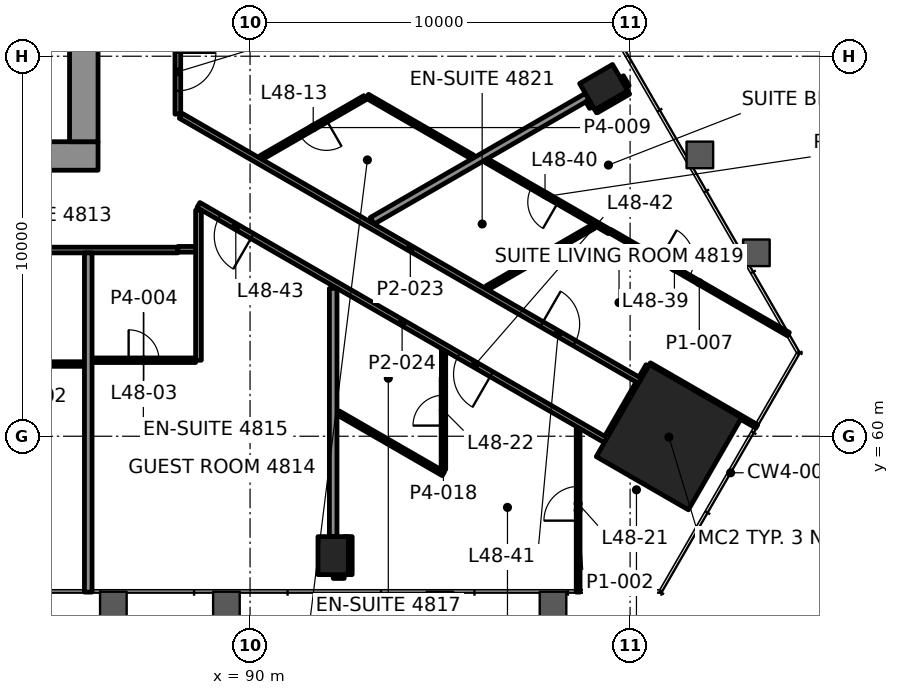
"""IFC4 building model, lengths in metres.
Left out: names, types, materials, properties, quantities, classifications, styles, units other than length and angle.
Written with IfcOpenShell. Run it as: python <this file> out.ifc"""

import sys

from ifc_helpers import new_model, si_unit, direction, frame, frame_2d, origin, origin_2d, place, context, subcontext, project, spatial, rectangle, hollow_rectangle, extrude, element, fill, save


model = new_model("IFC4")
c1 = context("Model", 3, precision=1e-05, world=origin(), true_north=direction((0.0, 1.0)))
c2 = subcontext(c1, "Body", "Model", "MODEL_VIEW")
j1 = project(units=[si_unit("LENGTHUNIT", "METRE"), si_unit("PLANEANGLEUNIT", "RADIAN")], contexts=[c1])
p1 = place(None, origin())
s1 = spatial("IfcSite", under=j1, at=p1, CompositionType="ELEMENT")
p2 = place(p1, origin())
s2 = spatial("IfcBuilding", under=s1, at=p2, CompositionType="ELEMENT")
p3 = place(p2, frame((0.0, 0.0, 206.5)))
s3 = spatial("IfcBuildingStorey", under=s2, at=p3, CompositionType="ELEMENT", Elevation=206.5)
p4 = place(p3, frame((101.022, 59.976, 0.0), z_axis=(0.0, 0.0, 1.0), x_axis=(0.5, 0.866025403784, 0.0)))
e1 = element("IfcColumn", 1, at=p4, inside=s3, PredefinedType="COLUMN", context=c2, shape_type="SweptSolid", body=[
    extrude(rectangle(XDim=2.8, YDim=2.8, at=origin_2d()), origin(), (0.0, 0.0, 1.0), 3.9),
])
for number, where, z_axis, x_axis in (
    (2, (92.188, 56.858, -0.0), (0.0, 0.0, 1.0), (1.0, 0.0, 0.0)),
    (3, (99.305, 69.186, -0.0), (0.0, 0.0, 1.0), (-0.5, 0.866, 0.0)),
):
    element("IfcColumn", number, at=place(p3, frame(where, z_axis=z_axis, x_axis=x_axis)), inside=s3, PredefinedType="COLUMN", context=c2, shape_type="SweptSolid", body=[
        extrude(hollow_rectangle(XDim=0.8, YDim=1.0, WallThickness=0.05, at=origin_2d()), origin(), (0.0, 0.0, 1.0), 3.9),
    ])
p5 = place(p3, frame((64.0, 67.375, 0.0), z_axis=(0.0, 0.0, 1.0), x_axis=(1.0, 0.0, 0.0)))
e4 = element("IfcWall", 4, at=p5, inside=s3, PredefinedType="SHEAR", context=c2, shape_type="SweptSolid", body=[
    extrude(rectangle(XDim=22.0, YDim=0.75, at=frame_2d((11.0, 0.0))), origin(), (0.0, 0.0, 1.0), 3.7),
])
p6 = place(p5, frame((1.575, 0.0, 0.0)))
e5 = element("IfcOpeningElement", 5, at=p6, cuts=e4, PredefinedType="OPENING", context=c2, shape_type="SweptSolid", body=[
    extrude(rectangle(XDim=0.9, YDim=2.1, at=frame_2d((0.45, 1.05))), frame((0.0, 0.385, 0.0), z_axis=(0.0, -1.0, 0.0), x_axis=(1.0, 0.0, 0.0)), (0.0, 0.0, 1.0), 0.77),
])
p7 = place(p5, frame((4.425, 0.0, 0.0)))
e6 = element("IfcOpeningElement", 6, at=p7, cuts=e4, PredefinedType="OPENING", context=c2, shape_type="SweptSolid", body=[
    extrude(rectangle(XDim=0.9, YDim=2.1, at=frame_2d((0.45, 1.05))), frame((0.0, 0.385, 0.0), z_axis=(0.0, -1.0, 0.0), x_axis=(1.0, 0.0, 0.0)), (0.0, 0.0, 1.0), 0.77),
])
p8 = place(p3, frame((85.625, 67.75, 0.0), z_axis=(0.0, 0.0, 1.0), x_axis=(0.0, 1.0, 0.0)))
e7 = element("IfcWall", 7, at=p8, inside=s3, PredefinedType="SHEAR", context=c2, shape_type="SweptSolid", body=[
    extrude(rectangle(XDim=14.5, YDim=0.75, at=frame_2d((7.25, 0.0))), origin(), (0.0, 0.0, 1.0), 3.7),
])
p9 = place(p8, frame((4.65, 0.0, 0.0)))
e8 = element("IfcOpeningElement", 8, at=p9, cuts=e7, PredefinedType="OPENING", context=c2, shape_type="SweptSolid", body=[
    extrude(rectangle(XDim=1.8, YDim=2.1, at=frame_2d((0.9, 1.05))), frame((0.0, 0.385, 0.0), z_axis=(0.0, -1.0, 0.0), x_axis=(1.0, 0.0, 0.0)), (0.0, 0.0, 1.0), 0.77),
])
p10 = place(p8, frame((11.8, 0.0, 0.0)))
e9 = element("IfcOpeningElement", 9, at=p10, cuts=e7, PredefinedType="OPENING", context=c2, shape_type="SweptSolid", body=[
    extrude(rectangle(XDim=0.9, YDim=2.1, at=frame_2d((0.45, 1.05))), frame((0.0, 0.385, 0.0), z_axis=(0.0, -1.0, 0.0), x_axis=(1.0, 0.0, 0.0)), (0.0, 0.0, 1.0), 0.77),
])
p11 = place(p3, frame((92.188, 56.358, 0.0), z_axis=(0.0, 0.0, 1.0), x_axis=(1.0, 0.0, 0.0)))
e10 = element("IfcWall", 10, at=p11, inside=s3, PredefinedType="PARTITIONING", context=c2, shape_type="SweptSolid", body=[
    extrude(rectangle(XDim=0.29, YDim=0.2, at=frame_2d((0.145, 0.0))), origin(), (0.0, 0.0, 1.0), 3.1),
])
p12 = place(p3, frame((82.365, 61.9, 0.0), z_axis=(0.0, 0.0, 1.0), x_axis=(1.0, 0.0, 0.0)))
e11 = element("IfcWall", 11, at=p12, inside=s3, PredefinedType="PARTITIONING", context=c2, shape_type="SweptSolid", body=[
    extrude(rectangle(XDim=3.267, YDim=0.12, at=frame_2d((1.634, 0.0))), origin(), (0.0, 0.0, 1.0), 3.1),
])
p13 = place(p12, frame((1.533, 0.0, 0.0)))
e12 = element("IfcOpeningElement", 12, at=p13, cuts=e11, PredefinedType="OPENING", context=c2, shape_type="SweptSolid", body=[
    extrude(rectangle(XDim=0.8, YDim=2.1, at=frame_2d((0.4, 1.05))), frame((0.0, 0.07, 0.0), z_axis=(0.0, -1.0, 0.0), x_axis=(1.0, 0.0, 0.0)), (0.0, 0.0, 1.0), 0.14),
])
p14 = place(p3, frame((85.842, 62.0, 0.0), z_axis=(0.0, 0.0, 1.0), x_axis=(1.0, 0.0, 0.0)))
e13 = element("IfcWall", 13, at=p14, inside=s3, PredefinedType="PARTITIONING", context=c2, shape_type="SweptSolid", body=[
    extrude(rectangle(XDim=2.725, YDim=0.12, at=frame_2d((1.363, 0.0))), origin(), (0.0, 0.0, 1.0), 3.1),
])
p15 = place(p14, frame((0.963, 0.0, 0.0)))
e14 = element("IfcOpeningElement", 14, at=p15, cuts=e13, PredefinedType="OPENING", context=c2, shape_type="SweptSolid", body=[
    extrude(rectangle(XDim=0.8, YDim=2.1, at=frame_2d((0.4, 1.05))), frame((0.0, 0.07, 0.0), z_axis=(0.0, -1.0, 0.0), x_axis=(1.0, 0.0, 0.0)), (0.0, 0.0, 1.0), 0.14),
])
p16 = place(p3, frame((88.1, 64.9, 0.0), z_axis=(0.0, 0.0, 1.0), x_axis=(-1.0, 0.0, 0.0)))
e15 = element("IfcWall", 15, at=p16, inside=s3, PredefinedType="PARTITIONING", context=c2, shape_type="SweptSolid", body=[
    extrude(rectangle(XDim=26.2, YDim=0.15, at=frame_2d((13.1, 0.0))), origin(), (0.0, 0.0, 1.0), 3.1),
])
p17 = place(p16, frame((7.443, 0.0, 0.0)))
e16 = element("IfcOpeningElement", 16, at=p17, cuts=e15, PredefinedType="OPENING", context=c2, shape_type="SweptSolid", body=[
    extrude(rectangle(XDim=1.0, YDim=2.1, at=frame_2d((0.5, 1.05))), frame((0.0, 0.085, 0.0), z_axis=(0.0, -1.0, 0.0), x_axis=(1.0, 0.0, 0.0)), (0.0, 0.0, 1.0), 0.17),
])
p18 = place(p16, frame((16.037, 0.0, 0.0)))
e17 = element("IfcOpeningElement", 17, at=p18, cuts=e15, PredefinedType="OPENING", context=c2, shape_type="SweptSolid", body=[
    extrude(rectangle(XDim=1.0, YDim=2.1, at=frame_2d((0.5, 1.05))), frame((0.0, 0.085, 0.0), z_axis=(0.0, -1.0, 0.0), x_axis=(1.0, 0.0, 0.0)), (0.0, 0.0, 1.0), 0.17),
])
p19 = place(p16, frame((19.747, 0.0, 0.0)))
e18 = element("IfcOpeningElement", 18, at=p19, cuts=e15, PredefinedType="OPENING", context=c2, shape_type="SweptSolid", body=[
    extrude(rectangle(XDim=1.0, YDim=2.1, at=frame_2d((0.5, 1.05))), frame((0.0, 0.085, 0.0), z_axis=(0.0, -1.0, 0.0), x_axis=(1.0, 0.0, 0.0)), (0.0, 0.0, 1.0), 0.17),
])
p20 = place(p16, frame((24.013, 0.0, 0.0)))
e19 = element("IfcOpeningElement", 19, at=p20, cuts=e15, PredefinedType="OPENING", context=c2, shape_type="SweptSolid", body=[
    extrude(rectangle(XDim=1.0, YDim=2.1, at=frame_2d((0.5, 1.05))), frame((0.0, 0.085, 0.0), z_axis=(0.0, -1.0, 0.0), x_axis=(1.0, 0.0, 0.0)), (0.0, 0.0, 1.0), 0.17),
])
p21 = place(p3, frame((88.1, 64.919, 0.0), z_axis=(0.0, 0.0, 1.0), x_axis=(1.0, 0.0, 0.0)))
e20 = element("IfcWall", 20, at=p21, inside=s3, PredefinedType="PARTITIONING", context=c2, shape_type="SweptSolid", body=[
    extrude(rectangle(XDim=0.468, YDim=0.15, at=frame_2d((0.234, 0.0))), origin(), (0.0, 0.0, 1.0), 3.1),
])
p22 = place(p3, frame((96.237, 63.904, 0.0), z_axis=(0.0, 0.0, 1.0), x_axis=(0.86605210011, 0.499953757757, 0.0)))
e21 = element("IfcWall", 21, at=p22, inside=s3, PredefinedType="PARTITIONING", context=c2, shape_type="SweptSolid", body=[
    extrude(rectangle(XDim=3.228, YDim=0.12, at=frame_2d((1.614, 0.0))), origin(), (0.0, 0.0, 1.0), 3.1),
])
p23 = place(p3, frame((99.073, 68.59, 0.0), z_axis=(0.0, 0.0, 1.0), x_axis=(0.866039090965, 0.499976292358, 0.0)))
e22 = element("IfcWall", 22, at=p23, inside=s3, PredefinedType="PARTITIONING", context=c2, shape_type="SweptSolid", body=[
    extrude(rectangle(XDim=0.999, YDim=0.2, at=frame_2d((0.5, 0.0))), origin(), (0.0, 0.0, 1.0), 3.1),
])
p24 = place(p3, frame((93.215, 65.669, 0.0), z_axis=(0.0, 0.0, 1.0), x_axis=(0.866021893259, 0.50000608036, 0.0)))
e23 = element("IfcWall", 23, at=p24, inside=s3, PredefinedType="PARTITIONING", context=c2, shape_type="SweptSolid", body=[
    extrude(rectangle(XDim=6.532, YDim=0.2, at=frame_2d((3.266, 0.0))), origin(), (0.0, 0.0, 1.0), 3.1),
])
p25 = place(p3, frame((93.027, 68.911, 0.0), z_axis=(0.0, 0.0, 1.0), x_axis=(-0.866028267601, -0.499995039691, 0.0)))
e24 = element("IfcWall", 24, at=p25, inside=s3, PredefinedType="PARTITIONING", context=c2, shape_type="SweptSolid", body=[
    extrude(rectangle(XDim=3.153, YDim=0.12, at=frame_2d((1.576, 0.0))), origin(), (0.0, 0.0, 1.0), 3.1),
])
p26 = place(p25, frame((1.176, 0.0, 0.0)))
e25 = element("IfcOpeningElement", 25, at=p26, cuts=e24, PredefinedType="OPENING", context=c2, shape_type="SweptSolid", body=[
    extrude(rectangle(XDim=0.8, YDim=2.1, at=frame_2d((0.4, 1.05))), frame((0.0, 0.07, 0.0), z_axis=(0.0, -1.0, 0.0), x_axis=(1.0, 0.0, 0.0)), (0.0, 0.0, 1.0), 0.14),
])
p27 = place(p3, frame((99.398, 59.962, 0.0), z_axis=(0.0, 0.0, 1.0), x_axis=(0.499927431592, 0.866067297121, 0.0)))
e26 = element("IfcWall", 26, at=p27, inside=s3, PredefinedType="PARTITIONING", context=c2, shape_type="SweptSolid", body=[
    extrude(rectangle(XDim=1.65, YDim=0.15, at=frame_2d((0.825, 0.0))), origin(), (0.0, 0.0, 1.0), 2.947),
])
p28 = place(p3, frame((98.633, 55.898, 0.0), z_axis=(0.0, 0.0, 1.0), x_axis=(0.0, 1.0, 0.0)))
e27 = element("IfcWall", 27, at=p28, inside=s3, PredefinedType="PARTITIONING", context=c2, shape_type="SweptSolid", body=[
    extrude(rectangle(XDim=4.302, YDim=0.1, at=frame_2d((2.151, 0.0))), origin(), (0.0, 0.0, 1.0), 3.1),
])
p29 = place(p28, frame((1.881, 0.0, 0.0)))
e28 = element("IfcOpeningElement", 28, at=p29, cuts=e27, PredefinedType="OPENING", context=c2, shape_type="SweptSolid", body=[
    extrude(rectangle(XDim=0.9, YDim=2.1, at=frame_2d((0.45, 1.05))), frame((0.0, 0.06, 0.0), z_axis=(0.0, -1.0, 0.0), x_axis=(1.0, 0.0, 0.0)), (0.0, 0.0, 1.0), 0.12),
])
p30 = place(p3, frame((95.088, 59.124, 0.0), z_axis=(0.0, 0.0, 1.0), x_axis=(0.0, 1.0, 0.0)))
e29 = element("IfcWall", 29, at=p30, inside=s3, PredefinedType="PARTITIONING", context=c2, shape_type="SweptSolid", body=[
    extrude(rectangle(XDim=3.113, YDim=0.12, at=frame_2d((1.556, 0.0))), origin(), (0.0, 0.0, 1.0), 3.1),
])
p31 = place(p30, frame((1.156, 0.0, 0.0)))
e30 = element("IfcOpeningElement", 30, at=p31, cuts=e29, PredefinedType="OPENING", context=c2, shape_type="SweptSolid", body=[
    extrude(rectangle(XDim=0.8, YDim=2.1, at=frame_2d((0.4, 1.05))), frame((0.0, 0.07, 0.0), z_axis=(0.0, -1.0, 0.0), x_axis=(1.0, 0.0, 0.0)), (0.0, 0.0, 1.0), 0.14),
])
p32 = place(p3, frame((92.587, 56.358, 0.0), z_axis=(0.0, 0.0, 1.0), x_axis=(0.0, 1.0, 0.0)))
e31 = element("IfcWall", 31, at=p32, inside=s3, PredefinedType="PARTITIONING", context=c2, shape_type="SweptSolid", body=[
    extrude(rectangle(XDim=1.0, YDim=0.2, at=frame_2d((0.5, 0.0))), origin(), (0.0, 0.0, 1.0), 3.1),
])
p33 = place(p3, frame((92.187, 57.358, 0.0), z_axis=(0.0, 0.0, 1.0), x_axis=(0.0, 1.0, 0.0)))
e32 = element("IfcWall", 32, at=p33, inside=s3, PredefinedType="PARTITIONING", context=c2, shape_type="SweptSolid", body=[
    extrude(rectangle(XDim=6.532, YDim=0.2, at=frame_2d((3.266, 0.0))), origin(), (0.0, 0.0, 1.0), 3.1),
])
p34 = place(p3, frame((88.643, 62.0, 0.0), z_axis=(0.0, 0.0, 1.0), x_axis=(0.0, 1.0, 0.0)))
e33 = element("IfcWall", 33, at=p34, inside=s3, PredefinedType="PARTITIONING", context=c2, shape_type="SweptSolid", body=[
    extrude(rectangle(XDim=3.947, YDim=0.15, at=frame_2d((1.974, 0.0))), origin(), (0.0, 0.0, 1.0), 2.947),
])
p35 = place(p3, frame((88.1, 85.1, 0.0), z_axis=(0.0, 0.0, 1.0), x_axis=(0.0, -1.0, 0.0)))
e34 = element("IfcWall", 34, at=p35, inside=s3, PredefinedType="PARTITIONING", context=c2, shape_type="SweptSolid", body=[
    extrude(rectangle(XDim=16.624, YDim=0.15, at=frame_2d((8.312, 0.0))), origin(), (0.0, 0.0, 1.0), 3.1),
])
p36 = place(p35, frame((2.707, 0.0, 0.0)))
e35 = element("IfcOpeningElement", 35, at=p36, cuts=e34, PredefinedType="OPENING", context=c2, shape_type="SweptSolid", body=[
    extrude(rectangle(XDim=0.9, YDim=2.1, at=frame_2d((0.45, 1.05))), frame((0.0, 0.085, 0.0), z_axis=(0.0, -1.0, 0.0), x_axis=(1.0, 0.0, 0.0)), (0.0, 0.0, 1.0), 0.17),
])
p37 = place(p35, frame((5.684, 0.0, 0.0)))
e36 = element("IfcOpeningElement", 36, at=p37, cuts=e34, PredefinedType="OPENING", context=c2, shape_type="SweptSolid", body=[
    extrude(rectangle(XDim=1.0, YDim=2.1, at=frame_2d((0.5, 1.05))), frame((0.0, 0.085, 0.0), z_axis=(0.0, -1.0, 0.0), x_axis=(1.0, 0.0, 0.0)), (0.0, 0.0, 1.0), 0.17),
])
p38 = place(p35, frame((15.01, 0.0, 0.0)))
e37 = element("IfcOpeningElement", 37, at=p38, cuts=e34, PredefinedType="OPENING", context=c2, shape_type="SweptSolid", body=[
    extrude(rectangle(XDim=1.0, YDim=2.1, at=frame_2d((0.5, 1.05))), frame((0.0, 0.085, 0.0), z_axis=(0.0, -1.0, 0.0), x_axis=(1.0, 0.0, 0.0)), (0.0, 0.0, 1.0), 0.17),
])
p39 = place(p3, frame((85.742, 55.898, 0.0), z_axis=(0.0, 0.0, 1.0), x_axis=(0.0, 1.0, 0.0)))
e38 = element("IfcWall", 38, at=p39, inside=s3, PredefinedType="PARTITIONING", context=c2, shape_type="SweptSolid", body=[
    extrude(rectangle(XDim=8.927, YDim=0.2, at=frame_2d((4.463, 0.0))), origin(), (0.0, 0.0, 1.0), 3.022),
])
p40 = place(p3, frame((99.888, 69.177, 0.0), z_axis=(0.0, 0.0, 1.0), x_axis=(-0.500005339912, 0.866022320763, 0.0)))
e39 = element("IfcWall", 39, at=p40, inside=s3, PredefinedType="PARTITIONING", context=c2, shape_type="SweptSolid", body=[
    extrude(rectangle(XDim=0.299, YDim=0.2, at=frame_2d((0.149, 0.0))), origin(), (0.0, 0.0, 1.0), 3.1),
])
p41 = place(p3, frame((99.022, 68.677, 0.0), z_axis=(0.0, 0.0, 1.0), x_axis=(-0.4999705729, 0.866042392862, 0.0)))
e40 = element("IfcWall", 40, at=p41, inside=s3, PredefinedType="PARTITIONING", context=c2, shape_type="SweptSolid", body=[
    extrude(rectangle(XDim=0.199, YDim=0.2, at=frame_2d((0.099, 0.0))), origin(), (0.0, 0.0, 1.0), 3.1),
])
p42 = place(p3, frame((99.475, 65.395, 0.0), z_axis=(0.0, 0.0, 1.0), x_axis=(0.866018196172, -0.500012483742, 0.0)))
e41 = element("IfcWall", 41, at=p42, inside=s3, PredefinedType="PARTITIONING", context=c2, shape_type="SweptSolid", body=[
    extrude(rectangle(XDim=5.416, YDim=0.1, at=frame_2d((2.708, 0.0))), origin(), (0.0, 0.0, 1.0), 3.1),
])
p43 = place(p42, frame((1.503, 0.0, 0.0)))
e42 = element("IfcOpeningElement", 42, at=p43, cuts=e41, PredefinedType="OPENING", context=c2, shape_type="SweptSolid", body=[
    extrude(rectangle(XDim=0.9, YDim=2.1, at=frame_2d((0.45, 1.05))), frame((0.0, 0.06, 0.0), z_axis=(0.0, -1.0, 0.0), x_axis=(1.0, 0.0, 0.0)), (0.0, 0.0, 1.0), 0.12),
])
p44 = place(p3, frame((99.456, 65.384, 0.0), z_axis=(0.0, 0.0, 1.0), x_axis=(-0.866053838069, 0.49995074714, 0.0)))
e43 = element("IfcWall", 43, at=p44, inside=s3, PredefinedType="PARTITIONING", context=c2, shape_type="SweptSolid", body=[
    extrude(rectangle(XDim=3.734, YDim=0.12, at=frame_2d((1.867, 0.0))), origin(), (0.0, 0.0, 1.0), 3.1),
])
p45 = place(p44, frame((1.556, 0.0, 0.0)))
e44 = element("IfcOpeningElement", 44, at=p45, cuts=e43, PredefinedType="OPENING", context=c2, shape_type="SweptSolid", body=[
    extrude(rectangle(XDim=0.8, YDim=2.1, at=frame_2d((0.4, 1.05))), frame((0.0, 0.07, 0.0), z_axis=(0.0, -1.0, 0.0), x_axis=(1.0, 0.0, 0.0)), (0.0, 0.0, 1.0), 0.14),
])
p46 = place(p3, frame((95.853, 67.349, 0.0), z_axis=(0.0, 0.0, 1.0), x_axis=(-0.866032814021, 0.499987164874, 0.0)))
e45 = element("IfcWall", 45, at=p46, inside=s3, PredefinedType="PARTITIONING", context=c2, shape_type="SweptSolid", body=[
    extrude(rectangle(XDim=3.193, YDim=0.12, at=frame_2d((1.597, 0.0))), origin(), (0.0, 0.0, 1.0), 3.1),
])
p47 = place(p3, frame((103.333, 60.259, 0.0), z_axis=(0.0, 0.0, 1.0), x_axis=(-0.866035906198, 0.499981808845, 0.0)))
e46 = element("IfcWall", 46, at=p47, inside=s3, PredefinedType="PARTITIONING", context=c2, shape_type="SweptSolid", body=[
    extrude(rectangle(XDim=3.259, YDim=0.1, at=frame_2d((1.63, 0.0))), origin(), (0.0, 0.0, 1.0), 3.1),
])
p48 = place(p3, frame((88.175, 68.433, 0.0), z_axis=(0.0, 0.0, 1.0), x_axis=(0.866030582951, -0.499991029314, 0.0)))
e47 = element("IfcWall", 47, at=p48, inside=s3, PredefinedType="PARTITIONING", context=c2, shape_type="SweptSolid", body=[
    extrude(rectangle(XDim=13.954, YDim=0.15, at=frame_2d((6.977, 0.0))), origin(), (0.0, 0.0, 1.0), 3.1),
])
p49 = place(p48, frame((10.967, 0.0, 0.0)))
e48 = element("IfcOpeningElement", 48, at=p49, cuts=e47, PredefinedType="OPENING", context=c2, shape_type="SweptSolid", body=[
    extrude(rectangle(XDim=1.0, YDim=2.1, at=frame_2d((0.5, 1.05))), frame((0.0, 0.085, 0.0), z_axis=(0.0, -1.0, 0.0), x_axis=(1.0, 0.0, 0.0)), (0.0, 0.0, 1.0), 0.17),
])
p50 = place(p3, frame((99.36, 59.897, 0.0), z_axis=(0.0, 0.0, 1.0), x_axis=(-0.866029863972, 0.499992274648, 0.0)))
e49 = element("IfcWall", 49, at=p50, inside=s3, PredefinedType="PARTITIONING", context=c2, shape_type="SweptSolid", body=[
    extrude(rectangle(XDim=12.375, YDim=0.15, at=frame_2d((6.188, 0.0))), origin(), (0.0, 0.0, 1.0), 2.947),
])
p51 = place(p50, frame((3.47, 0.0, 0.0)))
e50 = element("IfcOpeningElement", 50, at=p51, cuts=e49, PredefinedType="OPENING", context=c2, shape_type="SweptSolid", body=[
    extrude(rectangle(XDim=1.0, YDim=2.1, at=frame_2d((0.5, 1.05))), frame((0.0, 0.085, 0.0), z_axis=(0.0, -1.0, 0.0), x_axis=(1.0, 0.0, 0.0)), (0.0, 0.0, 1.0), 0.17),
])
p52 = place(p50, frame((10.74, 0.0, 0.0)))
e51 = element("IfcOpeningElement", 51, at=p52, cuts=e49, PredefinedType="OPENING", context=c2, shape_type="SweptSolid", body=[
    extrude(rectangle(XDim=1.0, YDim=2.1, at=frame_2d((0.5, 1.05))), frame((0.0, 0.085, 0.0), z_axis=(0.0, -1.0, 0.0), x_axis=(1.0, 0.0, 0.0)), (0.0, 0.0, 1.0), 0.17),
])
p53 = place(p3, frame((95.088, 59.014, 0.0), z_axis=(0.0, 0.0, 1.0), x_axis=(-0.865999709858, 0.500044500546, 0.0)))
e52 = element("IfcWall", 52, at=p53, inside=s3, PredefinedType="PARTITIONING", context=c2, shape_type="SweptSolid", body=[
    extrude(rectangle(XDim=3.194, YDim=0.12, at=frame_2d((1.597, 0.0))), origin(), (0.0, 0.0, 1.0), 3.1),
])
p54 = place(p3, frame((100.298, 61.521, 0.0), z_axis=(0.0, 0.0, 1.0), x_axis=(0.499647160578, 0.866229019905, 0.0)))
e53 = element("IfcWall", 53, at=p54, inside=s3, PredefinedType="PARTITIONING", context=c2, shape_type="SweptSolid", body=[
    extrude(rectangle(XDim=0.374, YDim=0.15, at=frame_2d((0.187, 0.0))), origin(), (0.0, 0.0, 1.0), 3.1),
])
p55 = place(p15, origin())
e54 = element("IfcDoor", 54, at=p55, inside=s3, OperationType="SINGLE_SWING_RIGHT", PredefinedType="DOOR", context=c2, shape_type="SweptSolid", body=[
    extrude(rectangle(XDim=0.8, YDim=2.1, at=frame_2d((0.4, 1.05))), frame((0.0, 0.025, 0.0), z_axis=(0.0, -1.0, 0.0), x_axis=(1.0, 0.0, 0.0)), (0.0, 0.0, 1.0), 0.05),
])
fill(e14, e54)
p56 = place(p26, origin())
e55 = element("IfcDoor", 55, at=p56, inside=s3, OperationType="SINGLE_SWING_LEFT", PredefinedType="DOOR", context=c2, shape_type="SweptSolid", body=[
    extrude(rectangle(XDim=0.8, YDim=2.1, at=frame_2d((0.4, 1.05))), frame((0.0, 0.025, 0.0), z_axis=(0.0, -1.0, 0.0), x_axis=(1.0, 0.0, 0.0)), (0.0, 0.0, 1.0), 0.05),
])
fill(e25, e55)
p57 = place(p29, origin())
e56 = element("IfcDoor", 56, at=p57, inside=s3, OperationType="SINGLE_SWING_LEFT", PredefinedType="DOOR", context=c2, shape_type="SweptSolid", body=[
    extrude(rectangle(XDim=0.9, YDim=2.1, at=frame_2d((0.45, 1.05))), frame((0.0, 0.025, 0.0), z_axis=(0.0, -1.0, 0.0), x_axis=(1.0, 0.0, 0.0)), (0.0, 0.0, 1.0), 0.05),
])
fill(e28, e56)
p58 = place(p31, origin())
e57 = element("IfcDoor", 57, at=p58, inside=s3, OperationType="SINGLE_SWING_RIGHT", PredefinedType="DOOR", context=c2, shape_type="SweptSolid", body=[
    extrude(rectangle(XDim=0.8, YDim=2.1, at=frame_2d((0.4, 1.05))), frame((0.0, 0.025, 0.0), z_axis=(0.0, -1.0, 0.0), x_axis=(1.0, 0.0, 0.0)), (0.0, 0.0, 1.0), 0.05),
])
fill(e30, e57)
p59 = place(p38, origin())
e58 = element("IfcDoor", 58, at=p59, inside=s3, OperationType="SINGLE_SWING_RIGHT", PredefinedType="DOOR", context=c2, shape_type="SweptSolid", body=[
    extrude(rectangle(XDim=1.0, YDim=2.1, at=frame_2d((0.5, 1.05))), frame((0.0, 0.025, 0.0), z_axis=(0.0, -1.0, 0.0), x_axis=(1.0, 0.0, 0.0)), (0.0, 0.0, 1.0), 0.05),
])
fill(e37, e58)
p60 = place(p43, origin())
e59 = element("IfcDoor", 59, at=p60, inside=s3, OperationType="SINGLE_SWING_RIGHT", PredefinedType="DOOR", context=c2, shape_type="SweptSolid", body=[
    extrude(rectangle(XDim=0.9, YDim=2.1, at=frame_2d((0.45, 1.05))), frame((0.0, 0.025, 0.0), z_axis=(0.0, -1.0, 0.0), x_axis=(1.0, 0.0, 0.0)), (0.0, 0.0, 1.0), 0.05),
])
fill(e42, e59)
p61 = place(p45, origin())
e60 = element("IfcDoor", 60, at=p61, inside=s3, OperationType="SINGLE_SWING_RIGHT", PredefinedType="DOOR", context=c2, shape_type="SweptSolid", body=[
    extrude(rectangle(XDim=0.8, YDim=2.1, at=frame_2d((0.4, 1.05))), frame((0.0, 0.025, 0.0), z_axis=(0.0, -1.0, 0.0), x_axis=(1.0, 0.0, 0.0)), (0.0, 0.0, 1.0), 0.05),
])
fill(e44, e60)
p62 = place(p49, origin())
e61 = element("IfcDoor", 61, at=p62, inside=s3, OperationType="SINGLE_SWING_LEFT", PredefinedType="DOOR", context=c2, shape_type="SweptSolid", body=[
    extrude(rectangle(XDim=1.0, YDim=2.1, at=frame_2d((0.5, 1.05))), frame((0.0, 0.025, 0.0), z_axis=(0.0, -1.0, 0.0), x_axis=(1.0, 0.0, 0.0)), (0.0, 0.0, 1.0), 0.05),
])
fill(e48, e61)
p63 = place(p51, origin())
e62 = element("IfcDoor", 62, at=p63, inside=s3, OperationType="SINGLE_SWING_LEFT", PredefinedType="DOOR", context=c2, shape_type="SweptSolid", body=[
    extrude(rectangle(XDim=1.0, YDim=2.1, at=frame_2d((0.5, 1.05))), frame((0.0, 0.025, 0.0), z_axis=(0.0, -1.0, 0.0), x_axis=(1.0, 0.0, 0.0)), (0.0, 0.0, 1.0), 0.05),
])
fill(e50, e62)
p64 = place(p52, origin())
e63 = element("IfcDoor", 63, at=p64, inside=s3, OperationType="SINGLE_SWING_LEFT", PredefinedType="DOOR", context=c2, shape_type="SweptSolid", body=[
    extrude(rectangle(XDim=1.0, YDim=2.1, at=frame_2d((0.5, 1.05))), frame((0.0, 0.025, 0.0), z_axis=(0.0, -1.0, 0.0), x_axis=(1.0, 0.0, 0.0)), (0.0, 0.0, 1.0), 0.05),
])
fill(e51, e63)
save(model, sys.argv[1])
